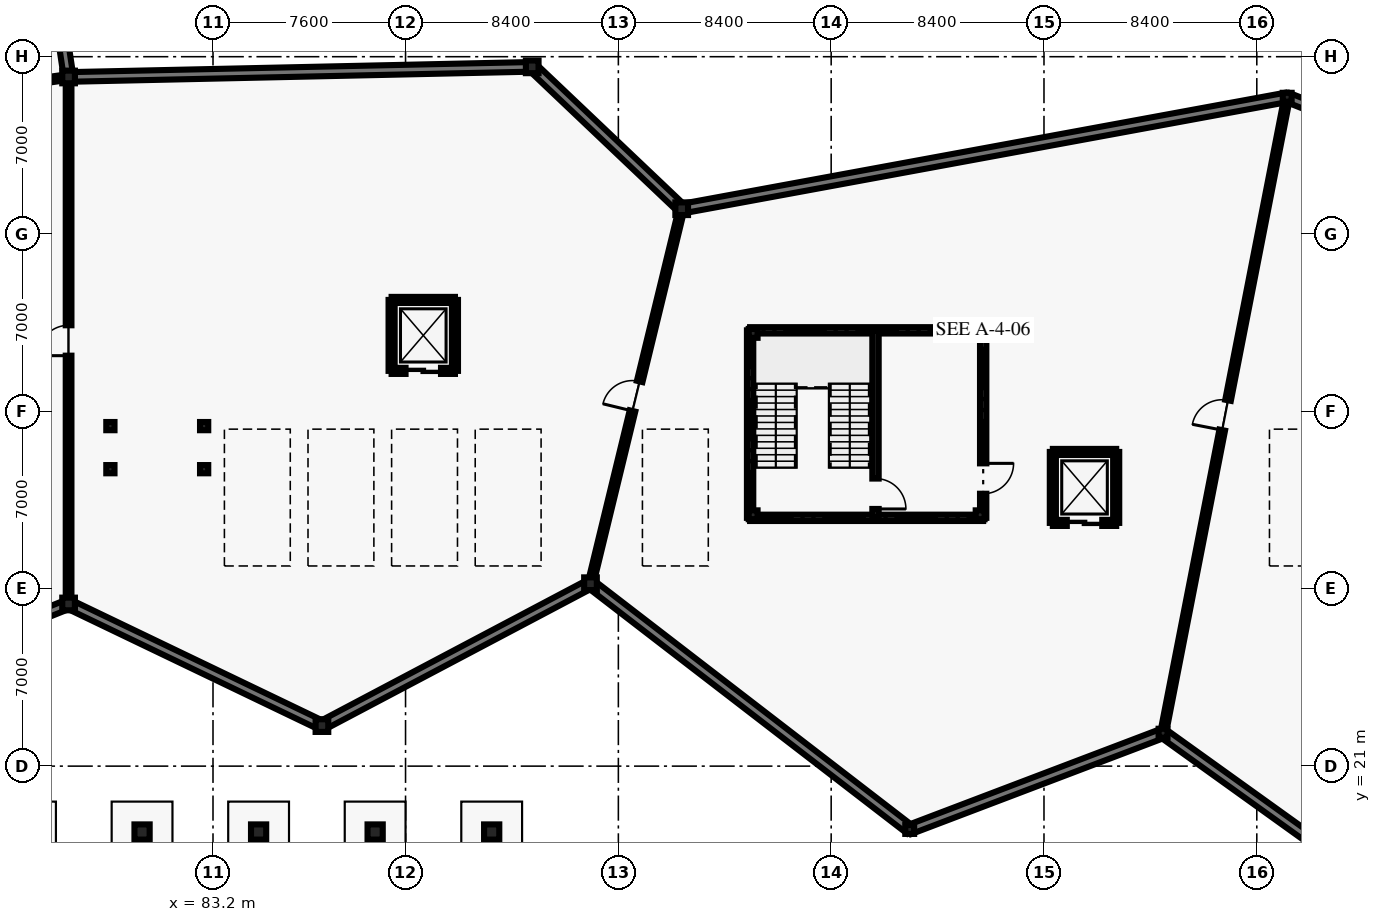
"""IFC4 building model, lengths in metres.
Left out: names, types, materials, properties, quantities, classifications, styles, units other than length and angle.
Written with IfcOpenShell. Run it as: python <this file> out.ifc"""

import sys

from ifc_helpers import new_model, si_unit, direction, frame, frame_2d, origin, origin_2d, place, context, subcontext, project, spatial, rectangle, hollow_circle, i_section, extrude, element, fill, save


model = new_model("IFC4")
c1 = context("Model", 3, precision=1e-05, world=origin(), true_north=direction((0.0, 1.0)))
c2 = subcontext(c1, "Body", "Model", "MODEL_VIEW")
j1 = project(units=[si_unit("LENGTHUNIT", "METRE"), si_unit("PLANEANGLEUNIT", "RADIAN")], contexts=[c1])
p1 = place(None, origin())
s1 = spatial("IfcSite", under=j1, at=p1, CompositionType="ELEMENT")
p2 = place(p1, origin())
s2 = spatial("IfcBuilding", under=s1, at=p2, CompositionType="ELEMENT")
p3 = place(p2, frame((0.0, 0.0, -4.5)))
s3 = spatial("IfcBuildingStorey", under=s2, at=p3, CompositionType="ELEMENT", Elevation=-4.5)
for number, where, z_axis, x_axis in (
    (1, (77.5, 27.4, 0.0), (0.0, 0.0, 1.0), (1.0, 0.0, 0.0)),
    (2, (77.5, 48.2, 0.0), (0.0, 0.0, 1.0), (1.0, 0.0, 0.0)),
    (3, (87.5, 22.6, 0.0), (0.0, 0.0, 1.0), (1.0, 0.0, 0.0)),
    (4, (95.8, 48.6, 0.0), (0.0, 0.0, 1.0), (1.0, 0.0, 0.0)),
    (5, (98.1, 28.2, 0.0), (0.0, 0.0, 1.0), (1.0, 0.0, 0.0)),
    (6, (101.7, 43.0, 0.0), (0.0, 0.0, 1.0), (1.0, 0.0, 0.0)),
):
    element("IfcColumn", number, at=place(p3, frame(where, z_axis=z_axis, x_axis=x_axis)), inside=s3, PredefinedType="COLUMN", context=c2, shape_type="SweptSolid", body=[
        extrude(i_section(OverallWidth=0.5, OverallDepth=0.5, WebThickness=0.022, FlangeThickness=0.036, at=origin_2d()), origin(), (0.0, 0.0, 1.0), 4.5),
    ])
for number, where, z_axis, x_axis in (
    (7, (110.7, 18.5, 0.0), (0.0, 0.0, 1.0), (1.0, 0.0, 0.0)),
    (8, (120.7, 22.3, 0.0), (0.0, 0.0, 1.0), (1.0, 0.0, 0.0)),
    (9, (125.6, 47.4, 0.0), (0.0, 0.0, 1.0), (1.0, 0.0, 0.0)),
    (10, (104.52, 30.92, 0.0), (0.0, 0.0, 1.0), (1.0, 0.0, 0.0)),
    (11, (113.48, 30.92, 0.0), (0.0, 0.0, 1.0), (1.0, 0.0, 0.0)),
    (12, (113.48, 38.08, 0.0), (0.0, 0.0, 1.0), (1.0, 0.0, 0.0)),
    (13, (104.52, 38.08, 0.0), (0.0, 0.0, 1.0), (1.0, 0.0, 0.0)),
):
    element("IfcColumn", number, at=place(p3, frame(where, z_axis=z_axis, x_axis=x_axis)), inside=s3, PredefinedType="COLUMN", context=c2, shape_type="SweptSolid", body=[
        extrude(i_section(OverallWidth=0.35, OverallDepth=0.35, WebThickness=0.02, FlangeThickness=0.028, at=origin_2d()), origin(), (0.0, 0.0, 1.0), 4.5),
    ])
for number, where, z_axis, x_axis in (
    (14, (80.4, 18.4, 0.0), (0.0, 0.0, 1.0), (1.0, 0.0, 0.0)),
    (15, (85.0, 18.4, 0.0), (0.0, 0.0, 1.0), (1.0, 0.0, 0.0)),
    (16, (89.6, 18.4, 0.0), (0.0, 0.0, 1.0), (1.0, 0.0, 0.0)),
    (17, (94.2, 18.4, 0.0), (0.0, 0.0, 1.0), (1.0, 0.0, 0.0)),
):
    element("IfcColumn", number, at=place(p3, frame(where, z_axis=z_axis, x_axis=x_axis)), inside=s3, PredefinedType="COLUMN", context=c2, shape_type="SweptSolid", body=[
        extrude(rectangle(XDim=0.6, YDim=0.6, at=origin_2d()), origin(), (0.0, 0.0, 1.0), 4.5),
    ])
p4 = place(p3, frame((66.0, 22.8, 0.0), z_axis=(0.0, 0.0, 1.0), x_axis=(0.928493068362, 0.371349730044, 0.0)))
e18 = element("IfcWall", 18, at=p4, inside=s3, PredefinedType="USERDEFINED", context=c2, shape_type="SweptSolid", body=[
    extrude(rectangle(XDim=12.336, YDim=0.38, at=frame_2d((6.168, 0.0))), origin(), (0.0, 0.0, 1.0), 4.14),
])
p5 = place(p3, frame((77.545, 27.378, 0.0), z_axis=(0.0, 0.0, 1.0), x_axis=(0.90154444727, -0.432686502675, 0.0)))
e19 = element("IfcWall", 19, at=p5, inside=s3, PredefinedType="USERDEFINED", context=c2, shape_type="SweptSolid", body=[
    extrude(rectangle(XDim=11.042, YDim=0.38, at=frame_2d((5.521, 0.0))), origin(), (0.0, 0.0, 1.0), 4.14),
])
p6 = place(p3, frame((87.5, 22.6, 0.0), z_axis=(0.0, 0.0, 1.0), x_axis=(0.884186531343, 0.467134004105, 0.0)))
e20 = element("IfcWall", 20, at=p6, inside=s3, PredefinedType="USERDEFINED", context=c2, shape_type="SweptSolid", body=[
    extrude(rectangle(XDim=11.938, YDim=0.38, at=frame_2d((5.969, 0.0))), origin(), (0.0, 0.0, 1.0), 4.14),
])
p7 = place(p3, frame((101.664, 43.034, 0.0), z_axis=(0.0, 0.0, 1.0), x_axis=(-0.725286613019, 0.688447041518, 0.0)))
e21 = element("IfcWall", 21, at=p7, inside=s3, PredefinedType="USERDEFINED", context=c2, shape_type="SweptSolid", body=[
    extrude(rectangle(XDim=8.085, YDim=0.38, at=frame_2d((4.042, 0.0))), origin(), (0.0, 0.0, 1.0), 4.14),
])
p8 = place(p3, frame((95.8, 48.6, 0.0), z_axis=(0.0, 0.0, 1.0), x_axis=(-0.999760886501, -0.021867094518, 0.0)))
e22 = element("IfcWall", 22, at=p8, inside=s3, PredefinedType="USERDEFINED", context=c2, shape_type="SweptSolid", body=[
    extrude(rectangle(XDim=18.254, YDim=0.38, at=frame_2d((9.127, 0.0))), origin(), (0.0, 0.0, 1.0), 4.14),
])
p9 = place(p3, frame((77.493, 48.249, 0.0), z_axis=(0.0, 0.0, 1.0), x_axis=(-0.149164377012, 0.988812413267, 0.0)))
e23 = element("IfcWall", 23, at=p9, inside=s3, PredefinedType="USERDEFINED", context=c2, shape_type="SweptSolid", body=[
    extrude(rectangle(XDim=18.053, YDim=0.38, at=frame_2d((9.026, 0.0))), origin(), (0.0, 0.0, 1.0), 4.14),
])
p10 = place(p3, frame((98.14, 28.17, 0.0), z_axis=(0.0, 0.0, 1.0), x_axis=(0.792369701833, -0.610041191739, 0.0)))
e24 = element("IfcWall", 24, at=p10, inside=s3, PredefinedType="USERDEFINED", context=c2, shape_type="SweptSolid", body=[
    extrude(rectangle(XDim=15.851, YDim=0.38, at=frame_2d((7.926, 0.0))), origin(), (0.0, 0.0, 1.0), 4.14),
])
p11 = place(p3, frame((110.7, 18.5, 0.0), z_axis=(0.0, 0.0, 1.0), x_axis=(0.934789976013, 0.355200930102, 0.0)))
e25 = element("IfcWall", 25, at=p11, inside=s3, PredefinedType="USERDEFINED", context=c2, shape_type="SweptSolid", body=[
    extrude(rectangle(XDim=10.647, YDim=0.38, at=frame_2d((5.324, 0.0))), origin(), (0.0, 0.0, 1.0), 4.14),
])
p12 = place(p3, frame((125.547, 47.39, 0.0), z_axis=(0.0, 0.0, 1.0), x_axis=(-0.98347527233, -0.181042505275, 0.0)))
e26 = element("IfcWall", 26, at=p12, inside=s3, PredefinedType="USERDEFINED", context=c2, shape_type="SweptSolid", body=[
    extrude(rectangle(XDim=24.198, YDim=0.38, at=frame_2d((12.099, 0.0))), origin(), (0.0, 0.0, 1.0), 4.14),
])
p13 = place(p3, frame((137.453, 42.718, 0.0), z_axis=(0.0, 0.0, 1.0), x_axis=(-0.930078278118, 0.367361397772, 0.0)))
e27 = element("IfcWall", 27, at=p13, inside=s3, PredefinedType="USERDEFINED", context=c2, shape_type="SweptSolid", body=[
    extrude(rectangle(XDim=12.693, YDim=0.38, at=frame_2d((6.347, 0.0))), origin(), (0.0, 0.0, 1.0), 4.14),
])
p14 = place(p3, frame((120.741, 22.271, 0.0), z_axis=(0.0, 0.0, 1.0), x_axis=(0.812517064674, -0.582937406256, 0.0)))
e28 = element("IfcWall", 28, at=p14, inside=s3, PredefinedType="USERDEFINED", context=c2, shape_type="SweptSolid", body=[
    extrude(rectangle(XDim=11.272, YDim=0.38, at=frame_2d((5.636, 0.0))), origin(), (0.0, 0.0, 1.0), 4.14),
])
p15 = place(p3, frame((77.5, 27.4, 0.0), z_axis=(0.0, 0.0, 1.0), x_axis=(0.0, 1.0, 0.0)))
e29 = element("IfcWall", 29, at=p15, inside=s3, PredefinedType="SOLIDWALL", context=c2, shape_type="SweptSolid", body=[
    extrude(rectangle(XDim=20.8, YDim=0.225, at=frame_2d((10.4, 0.0))), origin(), (0.0, 0.0, 1.0), 4.14),
])
p16 = place(p15, frame((9.8, 0.0, 0.0)))
e30 = element("IfcOpeningElement", 30, at=p16, cuts=e29, PredefinedType="OPENING", context=c2, shape_type="SweptSolid", body=[
    extrude(rectangle(XDim=1.2, YDim=2.2, at=frame_2d((0.6, 1.1))), frame((0.0, 0.123, 0.0), z_axis=(0.0, -1.0, 0.0), x_axis=(1.0, 0.0, 0.0)), (0.0, 0.0, 1.0), 0.245),
])
p17 = place(p3, frame((77.5, 48.2, 0.0), z_axis=(0.0, 0.0, 1.0), x_axis=(-0.990181159322, -0.139790098807, 0.0)))
e31 = element("IfcWall", 31, at=p17, inside=s3, PredefinedType="SOLIDWALL", context=c2, shape_type="SweptSolid", body=[
    extrude(rectangle(XDim=15.738, YDim=0.225, at=frame_2d((7.869, 0.0))), origin(), (0.0, 0.0, 1.0), 4.14),
])
p18 = place(p17, frame((7.294, 0.0, 0.0)))
e32 = element("IfcOpeningElement", 32, at=p18, cuts=e31, PredefinedType="OPENING", context=c2, shape_type="SweptSolid", body=[
    extrude(rectangle(XDim=1.15, YDim=2.2, at=frame_2d((0.575, 1.1))), frame((0.0, 0.123, 0.0), z_axis=(0.0, -1.0, 0.0), x_axis=(1.0, 0.0, 0.0)), (0.0, 0.0, 1.0), 0.245),
])
p19 = place(p3, frame((98.1, 28.2, 0.0), z_axis=(0.0, 0.0, 1.0), x_axis=(0.236341762997, 0.971669990822, 0.0)))
e33 = element("IfcWall", 33, at=p19, inside=s3, PredefinedType="SOLIDWALL", context=c2, shape_type="SweptSolid", body=[
    extrude(rectangle(XDim=15.231, YDim=0.225, at=frame_2d((7.616, 0.0))), origin(), (0.0, 0.0, 1.0), 4.14),
])
p20 = place(p19, frame((7.016, 0.0, 0.0)))
e34 = element("IfcOpeningElement", 34, at=p20, cuts=e33, PredefinedType="OPENING", context=c2, shape_type="SweptSolid", body=[
    extrude(rectangle(XDim=1.2, YDim=2.2, at=frame_2d((0.6, 1.1))), frame((0.0, 0.123, 0.0), z_axis=(0.0, -1.0, 0.0), x_axis=(1.0, 0.0, 0.0)), (0.0, 0.0, 1.0), 0.245),
])
p21 = place(p3, frame((120.7, 22.3, 0.0), z_axis=(0.0, 0.0, 1.0), x_axis=(0.191608827438, 0.981471373626, 0.0)))
e35 = element("IfcWall", 35, at=p21, inside=s3, PredefinedType="SOLIDWALL", context=c2, shape_type="SweptSolid", body=[
    extrude(rectangle(XDim=25.574, YDim=0.225, at=frame_2d((12.787, 0.0))), origin(), (0.0, 0.0, 1.0), 4.14),
])
p22 = place(p21, frame((12.187, 0.0, 0.0)))
e36 = element("IfcOpeningElement", 36, at=p22, cuts=e35, PredefinedType="OPENING", context=c2, shape_type="SweptSolid", body=[
    extrude(rectangle(XDim=1.2, YDim=2.2, at=frame_2d((0.6, 1.1))), frame((0.0, 0.123, 0.0), z_axis=(0.0, -1.0, 0.0), x_axis=(1.0, 0.0, 0.0)), (0.0, 0.0, 1.0), 0.245),
])
p23 = place(p3, frame((104.4, 30.8, 0.0), z_axis=(0.0, 0.0, 1.0), x_axis=(0.0, 1.0, 0.0)))
e37 = element("IfcWall", 37, at=p23, inside=s3, PredefinedType="SHEAR", context=c2, shape_type="SweptSolid", body=[
    extrude(rectangle(XDim=7.4, YDim=0.25, at=frame_2d((3.7, 0.0))), origin(), (0.0, 0.0, 1.0), 4.14),
])
for number, where, z_axis, x_axis in (
    (38, (104.4, 38.2, 0.0), (0.0, 0.0, 1.0), (1.0, 0.0, 0.0)),
    (39, (113.6, 30.8, 0.0), (0.0, 0.0, 1.0), (-1.0, 0.0, 0.0)),
):
    element("IfcWall", number, at=place(p3, frame(where, z_axis=z_axis, x_axis=x_axis)), inside=s3, PredefinedType="SHEAR", context=c2, shape_type="SweptSolid", body=[
        extrude(rectangle(XDim=9.2, YDim=0.25, at=frame_2d((4.6, 0.0))), origin(), (0.0, 0.0, 1.0), 4.14),
    ])
p24 = place(p3, frame((113.6, 38.2, 0.0), z_axis=(0.0, 0.0, 1.0), x_axis=(0.0, -1.0, 0.0)))
e40 = element("IfcWall", 40, at=p24, inside=s3, PredefinedType="SHEAR", context=c2, shape_type="SweptSolid", body=[
    extrude(rectangle(XDim=7.4, YDim=0.25, at=frame_2d((3.7, 0.0))), origin(), (0.0, 0.0, 1.0), 4.14),
])
p25 = place(p24, frame((5.25, 0.0, 0.0)))
e41 = element("IfcOpeningElement", 41, at=p25, cuts=e40, PredefinedType="OPENING", context=c2, shape_type="SweptSolid", body=[
    extrude(rectangle(XDim=1.2, YDim=2.2, at=frame_2d((0.6, 1.1))), frame((0.0, 0.135, 0.0), z_axis=(0.0, -1.0, 0.0), x_axis=(1.0, 0.0, 0.0)), (0.0, 0.0, 1.0), 0.27),
])
p26 = place(p3, frame((109.35, 38.2, 0.0), z_axis=(0.0, 0.0, 1.0), x_axis=(0.0, -1.0, 0.0)))
e42 = element("IfcWall", 42, at=p26, inside=s3, PredefinedType="SHEAR", context=c2, shape_type="SweptSolid", body=[
    extrude(rectangle(XDim=7.4, YDim=0.25, at=frame_2d((3.7, 0.0))), origin(), (0.0, 0.0, 1.0), 4.14),
])
p27 = place(p26, frame((5.85, 0.0, 0.0)))
e43 = element("IfcOpeningElement", 43, at=p27, cuts=e42, PredefinedType="OPENING", context=c2, shape_type="SweptSolid", body=[
    extrude(rectangle(XDim=1.2, YDim=2.2, at=frame_2d((0.6, 1.1))), frame((0.0, 0.135, 0.0), z_axis=(0.0, -1.0, 0.0), x_axis=(1.0, 0.0, 0.0)), (0.0, 0.0, 1.0), 0.27),
])
for number, where, z_axis, x_axis in (
    (44, (79.15, 32.72, 0.0), (0.0, 0.0, 1.0), (1.0, 0.0, 0.0)),
    (45, (82.85, 32.72, 0.0), (0.0, 0.0, 1.0), (1.0, 0.0, 0.0)),
    (46, (79.15, 34.42, 0.0), (0.0, 0.0, 1.0), (1.0, 0.0, 0.0)),
    (47, (82.85, 34.42, 0.0), (0.0, 0.0, 1.0), (1.0, 0.0, 0.0)),
):
    element("IfcColumn", number, at=place(p3, frame(where, z_axis=z_axis, x_axis=x_axis)), inside=s3, PredefinedType="COLUMN", context=c2, shape_type="SweptSolid", body=[
        extrude(hollow_circle(Radius=0.162, WallThickness=0.01, at=origin_2d()), origin(), (0.0, 0.0, 1.0), 4.5),
    ])
p28 = place(p3, frame((90.25, 39.4, 0.0), z_axis=(0.0, 0.0, 1.0), x_axis=(1.0, 0.0, 0.0)))
e48 = element("IfcWall", 48, at=p28, inside=s3, PredefinedType="SHEAR", context=c2, shape_type="SweptSolid", body=[
    extrude(rectangle(XDim=2.5, YDim=0.24, at=frame_2d((1.25, 0.0))), origin(), (0.0, 0.0, 1.0), 4.26),
])
for number, where, z_axis, x_axis in (
    (49, (92.75, 39.4, 0.0), (0.0, 0.0, 1.0), (0.0, -1.0, 0.0)),
    (50, (90.25, 36.6, 0.0), (0.0, 0.0, 1.0), (0.0, 1.0, 0.0)),
):
    element("IfcWall", number, at=place(p3, frame(where, z_axis=z_axis, x_axis=x_axis)), inside=s3, PredefinedType="SHEAR", context=c2, shape_type="SweptSolid", body=[
        extrude(rectangle(XDim=2.8, YDim=0.24, at=frame_2d((1.4, 0.0))), origin(), (0.0, 0.0, 1.0), 4.26),
    ])
p29 = place(p3, frame((92.75, 36.6, 0.0), z_axis=(0.0, 0.0, 1.0), x_axis=(-1.0, 0.0, 0.0)))
e51 = element("IfcWall", 51, at=p29, inside=s3, PredefinedType="SHEAR", context=c2, shape_type="SweptSolid", body=[
    extrude(rectangle(XDim=2.5, YDim=0.24, at=frame_2d((1.25, 0.0))), origin(), (0.0, 0.0, 1.0), 4.26),
])
p30 = place(p29, frame((0.55, 0.0, 0.0)))
e52 = element("IfcOpeningElement", 52, at=p30, cuts=e51, PredefinedType="OPENING", context=c2, shape_type="SweptSolid", body=[
    extrude(rectangle(XDim=1.4, YDim=2.3, at=frame_2d((0.7, 1.15))), frame((0.0, 0.13, 0.0), z_axis=(0.0, -1.0, 0.0), x_axis=(1.0, 0.0, 0.0)), (0.0, 0.0, 1.0), 0.26),
])
p31 = place(p3, frame((116.35, 33.4, 0.0), z_axis=(0.0, 0.0, 1.0), x_axis=(1.0, 0.0, 0.0)))
e53 = element("IfcWall", 53, at=p31, inside=s3, PredefinedType="SHEAR", context=c2, shape_type="SweptSolid", body=[
    extrude(rectangle(XDim=2.5, YDim=0.24, at=frame_2d((1.25, 0.0))), origin(), (0.0, 0.0, 1.0), 4.26),
])
for number, where, z_axis, x_axis in (
    (54, (118.85, 33.4, 0.0), (0.0, 0.0, 1.0), (0.0, -1.0, 0.0)),
    (55, (116.35, 30.6, 0.0), (0.0, 0.0, 1.0), (0.0, 1.0, 0.0)),
):
    element("IfcWall", number, at=place(p3, frame(where, z_axis=z_axis, x_axis=x_axis)), inside=s3, PredefinedType="SHEAR", context=c2, shape_type="SweptSolid", body=[
        extrude(rectangle(XDim=2.8, YDim=0.24, at=frame_2d((1.4, 0.0))), origin(), (0.0, 0.0, 1.0), 4.26),
    ])
p32 = place(p3, frame((118.85, 30.6, 0.0), z_axis=(0.0, 0.0, 1.0), x_axis=(-1.0, 0.0, 0.0)))
e56 = element("IfcWall", 56, at=p32, inside=s3, PredefinedType="SHEAR", context=c2, shape_type="SweptSolid", body=[
    extrude(rectangle(XDim=2.5, YDim=0.24, at=frame_2d((1.25, 0.0))), origin(), (0.0, 0.0, 1.0), 4.26),
])
p33 = place(p32, frame((0.55, 0.0, 0.0)))
e57 = element("IfcOpeningElement", 57, at=p33, cuts=e56, PredefinedType="OPENING", context=c2, shape_type="SweptSolid", body=[
    extrude(rectangle(XDim=1.4, YDim=2.3, at=frame_2d((0.7, 1.15))), frame((0.0, 0.13, 0.0), z_axis=(0.0, -1.0, 0.0), x_axis=(1.0, 0.0, 0.0)), (0.0, 0.0, 1.0), 0.26),
])
p34 = place(p16, origin())
e58 = element("IfcDoor", 58, at=p34, inside=s3, OperationType="SINGLE_SWING_LEFT", PredefinedType="DOOR", context=c2, shape_type="SweptSolid", body=[
    extrude(rectangle(XDim=1.2, YDim=2.2, at=frame_2d((0.6, 1.1))), frame((0.0, 0.025, 0.0), z_axis=(0.0, -1.0, 0.0), x_axis=(1.0, 0.0, 0.0)), (0.0, 0.0, 1.0), 0.05),
])
fill(e30, e58)
p35 = place(p20, origin())
e59 = element("IfcDoor", 59, at=p35, inside=s3, OperationType="SINGLE_SWING_LEFT", PredefinedType="DOOR", context=c2, shape_type="SweptSolid", body=[
    extrude(rectangle(XDim=1.2, YDim=2.2, at=frame_2d((0.6, 1.1))), frame((0.0, 0.025, 0.0), z_axis=(0.0, -1.0, 0.0), x_axis=(1.0, 0.0, 0.0)), (0.0, 0.0, 1.0), 0.05),
])
fill(e34, e59)
p36 = place(p22, origin())
e60 = element("IfcDoor", 60, at=p36, inside=s3, OperationType="SINGLE_SWING_LEFT", PredefinedType="DOOR", context=c2, shape_type="SweptSolid", body=[
    extrude(rectangle(XDim=1.2, YDim=2.2, at=frame_2d((0.6, 1.1))), frame((0.0, 0.025, 0.0), z_axis=(0.0, -1.0, 0.0), x_axis=(1.0, 0.0, 0.0)), (0.0, 0.0, 1.0), 0.05),
])
fill(e36, e60)
p37 = place(p25, origin())
e61 = element("IfcDoor", 61, at=p37, inside=s3, OperationType="SINGLE_SWING_LEFT", PredefinedType="DOOR", context=c2, shape_type="SweptSolid", body=[
    extrude(rectangle(XDim=1.2, YDim=2.2, at=frame_2d((0.6, 1.1))), frame((0.0, 0.025, 0.0), z_axis=(0.0, -1.0, 0.0), x_axis=(1.0, 0.0, 0.0)), (0.0, 0.0, 1.0), 0.05),
])
fill(e41, e61)
p38 = place(p27, origin())
e62 = element("IfcDoor", 62, at=p38, inside=s3, OperationType="SINGLE_SWING_RIGHT", PredefinedType="DOOR", context=c2, shape_type="SweptSolid", body=[
    extrude(rectangle(XDim=1.2, YDim=2.2, at=frame_2d((0.6, 1.1))), frame((0.0, 0.025, 0.0), z_axis=(0.0, -1.0, 0.0), x_axis=(1.0, 0.0, 0.0)), (0.0, 0.0, 1.0), 0.05),
])
fill(e43, e62)
p39 = place(p30, origin())
e63 = element("IfcDoor", 63, at=p39, inside=s3, OperationType="SLIDING_TO_LEFT", PredefinedType="DOOR", context=c2, shape_type="SweptSolid", body=[
    extrude(rectangle(XDim=1.4, YDim=2.3, at=frame_2d((0.7, 1.15))), frame((0.0, 0.025, 0.0), z_axis=(0.0, -1.0, 0.0), x_axis=(1.0, 0.0, 0.0)), (0.0, 0.0, 1.0), 0.05),
])
fill(e52, e63)
p40 = place(p33, origin())
e64 = element("IfcDoor", 64, at=p40, inside=s3, OperationType="SLIDING_TO_LEFT", PredefinedType="DOOR", context=c2, shape_type="SweptSolid", body=[
    extrude(rectangle(XDim=1.4, YDim=2.3, at=frame_2d((0.7, 1.15))), frame((0.0, 0.025, 0.0), z_axis=(0.0, -1.0, 0.0), x_axis=(1.0, 0.0, 0.0)), (0.0, 0.0, 1.0), 0.05),
])
fill(e57, e64)
save(model, sys.argv[1])
